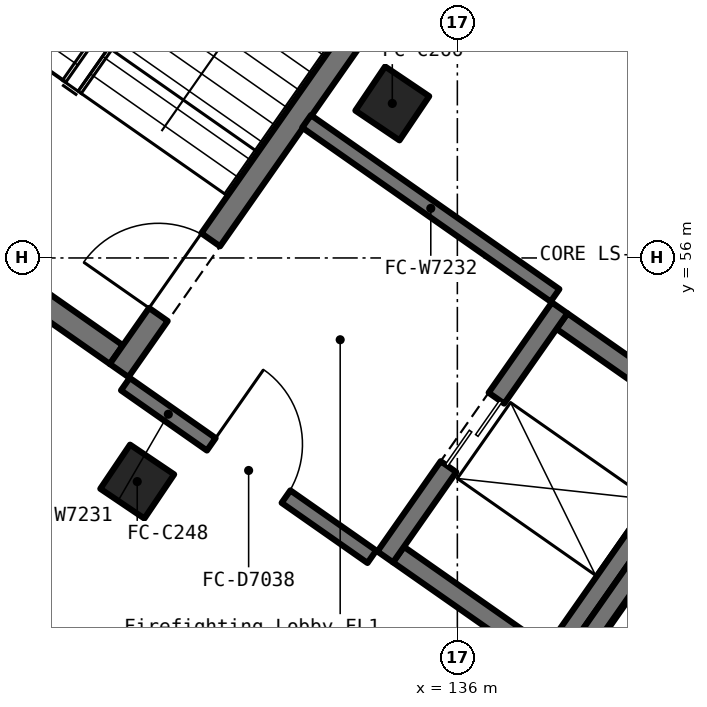
"""IFC4 building model, lengths in metres.
Left out: names, types, materials, properties, quantities, classifications, styles, units other than length and angle.
Written with IfcOpenShell. Run it as: python <this file> out.ifc"""

import sys

from ifc_helpers import new_model, si_unit, direction, frame, frame_2d, origin, origin_2d, place, context, subcontext, project, spatial, rectangle, extrude, element, fill, save


model = new_model("IFC4")
c1 = context("Model", 3, precision=1e-05, world=origin(), true_north=direction((0.0, 1.0)))
c2 = subcontext(c1, "Body", "Model", "MODEL_VIEW")
j1 = project(units=[si_unit("LENGTHUNIT", "METRE"), si_unit("PLANEANGLEUNIT", "RADIAN")], contexts=[c1])
p1 = place(None, origin())
s1 = spatial("IfcSite", under=j1, at=p1, CompositionType="ELEMENT")
p2 = place(p1, origin())
s2 = spatial("IfcBuilding", under=s1, at=p2, CompositionType="ELEMENT")
p3 = place(p2, origin())
s3 = spatial("IfcBuildingStorey", under=s2, at=p3, CompositionType="ELEMENT", Elevation=0.0)
for number, where, z_axis, x_axis in (
    (1, (131.788, 53.058, 0.0), (0.0, 0.0, 1.0), (0.829, -0.559, 0.0)),
    (2, (135.144, 58.033, 0.0), (0.0, 0.0, 1.0), (0.829, -0.559, 0.0)),
):
    element("IfcColumn", number, at=place(p3, frame(where, z_axis=z_axis, x_axis=x_axis)), inside=s3, PredefinedType="COLUMN", context=c2, shape_type="SweptSolid", body=[
        extrude(rectangle(XDim=0.7, YDim=0.7, at=origin_2d()), origin(), (0.0, 0.0, 1.0), 6.0),
    ])
p4 = place(p3, frame((127.418, 57.596, 0.0), z_axis=(0.0, 0.0, 1.0), x_axis=(0.819096538389, -0.573655698829, 0.0)))
e3 = element("IfcWall", 3, at=p4, inside=s3, PredefinedType="SOLIDWALL", context=c2, shape_type="SweptSolid", body=[
    extrude(rectangle(XDim=4.999, YDim=0.3, at=frame_2d((2.5, 0.0))), origin(), (0.0, 0.0, 1.0), 6.0),
])
p5 = place(p3, frame((131.55, 54.519, 0.0), z_axis=(0.0, 0.0, 1.0), x_axis=(0.573563925118, 0.819160804606, 0.0)))
e4 = element("IfcWall", 4, at=p5, inside=s3, PredefinedType="SOLIDWALL", context=c2, shape_type="SweptSolid", body=[
    extrude(rectangle(XDim=10.0, YDim=0.3, at=frame_2d((5.0, 0.0))), origin(), (0.0, 0.0, 1.0), 6.0),
])
p6 = place(p5, frame((0.9, 0.0, 0.0)))
e5 = element("IfcOpeningElement", 5, at=p6, cuts=e4, PredefinedType="OPENING", context=c2, shape_type="SweptSolid", body=[
    extrude(rectangle(XDim=1.2, YDim=2.1, at=frame_2d((0.6, 1.05))), frame((0.0, 0.162, 0.0), z_axis=(0.0, -1.0, 0.0), x_axis=(1.0, 0.0, 0.0)), (0.0, 0.0, 1.0), 0.324),
])
p7 = place(p3, frame((132.944, 65.751, 0.0), z_axis=(0.0, 0.0, 1.0), x_axis=(-0.573514776444, -0.819195215563, 0.0)))
e6 = element("IfcWall", 6, at=p7, inside=s3, PredefinedType="SOLIDWALL", context=c2, shape_type="SweptSolid", body=[
    extrude(rectangle(XDim=10.0, YDim=0.3, at=frame_2d((5.0, 0.0))), origin(), (0.0, 0.0, 1.0), 6.0),
])
p8 = place(p3, frame((135.225, 52.098, 0.0), z_axis=(0.0, 0.0, 1.0), x_axis=(0.819366508838, -0.573270027295, 0.0)))
e7 = element("IfcWall", 7, at=p8, inside=s3, PredefinedType="SOLIDWALL", context=c2, shape_type="SweptSolid", body=[
    extrude(rectangle(XDim=2.301, YDim=0.25, at=frame_2d((1.15, 0.0))), origin(), (0.0, 0.0, 1.0), 6.0),
])
p9 = place(p3, frame((137.141, 50.605, 0.0), z_axis=(0.0, 0.0, 1.0), x_axis=(0.573572956461, 0.819154480923, 0.0)))
e8 = element("IfcWall", 8, at=p9, inside=s3, PredefinedType="SOLIDWALL", context=c2, shape_type="SweptSolid", body=[
    extrude(rectangle(XDim=4.0, YDim=0.25, at=frame_2d((2.0, 0.0))), origin(), (0.0, 0.0, 1.0), 6.0),
])
p10 = place(p3, frame((139.261, 53.85, 0.0), z_axis=(0.0, 0.0, 1.0), x_axis=(-0.819226933165, 0.573469469089, 0.0)))
e9 = element("IfcWall", 9, at=p10, inside=s3, PredefinedType="SOLIDWALL", context=c2, shape_type="SweptSolid", body=[
    extrude(rectangle(XDim=2.3, YDim=0.25, at=frame_2d((1.15, 0.0))), origin(), (0.0, 0.0, 1.0), 6.0),
])
p11 = place(p3, frame((137.346, 55.343, 0.0), z_axis=(0.0, 0.0, 1.0), x_axis=(-0.573736768582, -0.819039755065, 0.0)))
e10 = element("IfcWall", 10, at=p11, inside=s3, PredefinedType="SOLIDWALL", context=c2, shape_type="SweptSolid", body=[
    extrude(rectangle(XDim=4.0, YDim=0.25, at=frame_2d((2.0, 0.0))), origin(), (0.0, 0.0, 1.0), 6.0),
])
p12 = place(p11, frame((1.45, 0.0, 0.0)))
e11 = element("IfcOpeningElement", 11, at=p12, cuts=e10, PredefinedType="OPENING", context=c2, shape_type="SweptSolid", body=[
    extrude(rectangle(XDim=1.1, YDim=2.1, at=frame_2d((0.55, 1.05))), frame((0.0, 0.137, 0.0), z_axis=(0.0, -1.0, 0.0), x_axis=(1.0, 0.0, 0.0)), (0.0, 0.0, 1.0), 0.274),
])
p13 = place(p3, frame((139.639, 53.737, 0.0), z_axis=(0.0, 0.0, 1.0), x_axis=(-0.573572956461, -0.819154480923, 0.0)))
e12 = element("IfcWall", 12, at=p13, inside=s3, PredefinedType="SOLIDWALL", context=c2, shape_type="SweptSolid", body=[
    extrude(rectangle(XDim=4.0, YDim=0.25, at=frame_2d((2.0, 0.0))), origin(), (0.0, 0.0, 1.0), 6.0),
])
p14 = place(p3, frame((131.632, 54.34, 0.0), z_axis=(0.0, 0.0, 1.0), x_axis=(0.81911891796, -0.573623742744, 0.0)))
e13 = element("IfcWall", 13, at=p14, inside=s3, PredefinedType="PARTITIONING", context=c2, shape_type="SweptSolid", body=[
    extrude(rectangle(XDim=3.959, YDim=0.2, at=frame_2d((1.979, 0.0))), origin(), (0.0, 0.0, 1.0), 5.78),
])
p15 = place(p14, frame((1.38, 0.0, 0.0)))
e14 = element("IfcOpeningElement", 14, at=p15, cuts=e13, PredefinedType="OPENING", context=c2, shape_type="SweptSolid", body=[
    extrude(rectangle(XDim=1.2, YDim=2.1, at=frame_2d((0.6, 1.05))), frame((0.0, 0.112, 0.0), z_axis=(0.0, -1.0, 0.0), x_axis=(1.0, 0.0, 0.0)), (0.0, 0.0, 1.0), 0.224),
])
p16 = place(p3, frame((137.285, 55.508, 0.0), z_axis=(0.0, 0.0, 1.0), x_axis=(-0.819125561737, 0.573614255497, 0.0)))
e15 = element("IfcWall", 15, at=p16, inside=s3, PredefinedType="PARTITIONING", context=c2, shape_type="SweptSolid", body=[
    extrude(rectangle(XDim=3.99, YDim=0.2, at=frame_2d((1.995, 0.0))), origin(), (0.0, 0.0, 1.0), 5.78),
])
p17 = place(p6, origin())
e16 = element("IfcDoor", 16, at=p17, inside=s3, OperationType="SINGLE_SWING_LEFT", PredefinedType="DOOR", context=c2, shape_type="SweptSolid", body=[
    extrude(rectangle(XDim=1.2, YDim=2.1, at=frame_2d((0.6, 1.05))), frame((0.0, 0.025, 0.0), z_axis=(0.0, -1.0, 0.0), x_axis=(1.0, 0.0, 0.0)), (0.0, 0.0, 1.0), 0.05),
])
fill(e5, e16)
p18 = place(p12, origin())
e17 = element("IfcDoor", 17, at=p18, inside=s3, OperationType="DOUBLE_DOOR_SLIDING", PredefinedType="DOOR", context=c2, shape_type="SweptSolid", body=[
    extrude(rectangle(XDim=1.1, YDim=2.1, at=frame_2d((0.55, 1.05))), frame((0.0, 0.025, 0.0), z_axis=(0.0, -1.0, 0.0), x_axis=(1.0, 0.0, 0.0)), (0.0, 0.0, 1.0), 0.05),
])
fill(e11, e17)
p19 = place(p15, origin())
e18 = element("IfcDoor", 18, at=p19, inside=s3, OperationType="SINGLE_SWING_LEFT", PredefinedType="DOOR", context=c2, shape_type="SweptSolid", body=[
    extrude(rectangle(XDim=1.2, YDim=2.1, at=frame_2d((0.6, 1.05))), frame((0.0, 0.025, 0.0), z_axis=(0.0, -1.0, 0.0), x_axis=(1.0, 0.0, 0.0)), (0.0, 0.0, 1.0), 0.05),
])
fill(e14, e18)
save(model, sys.argv[1])
